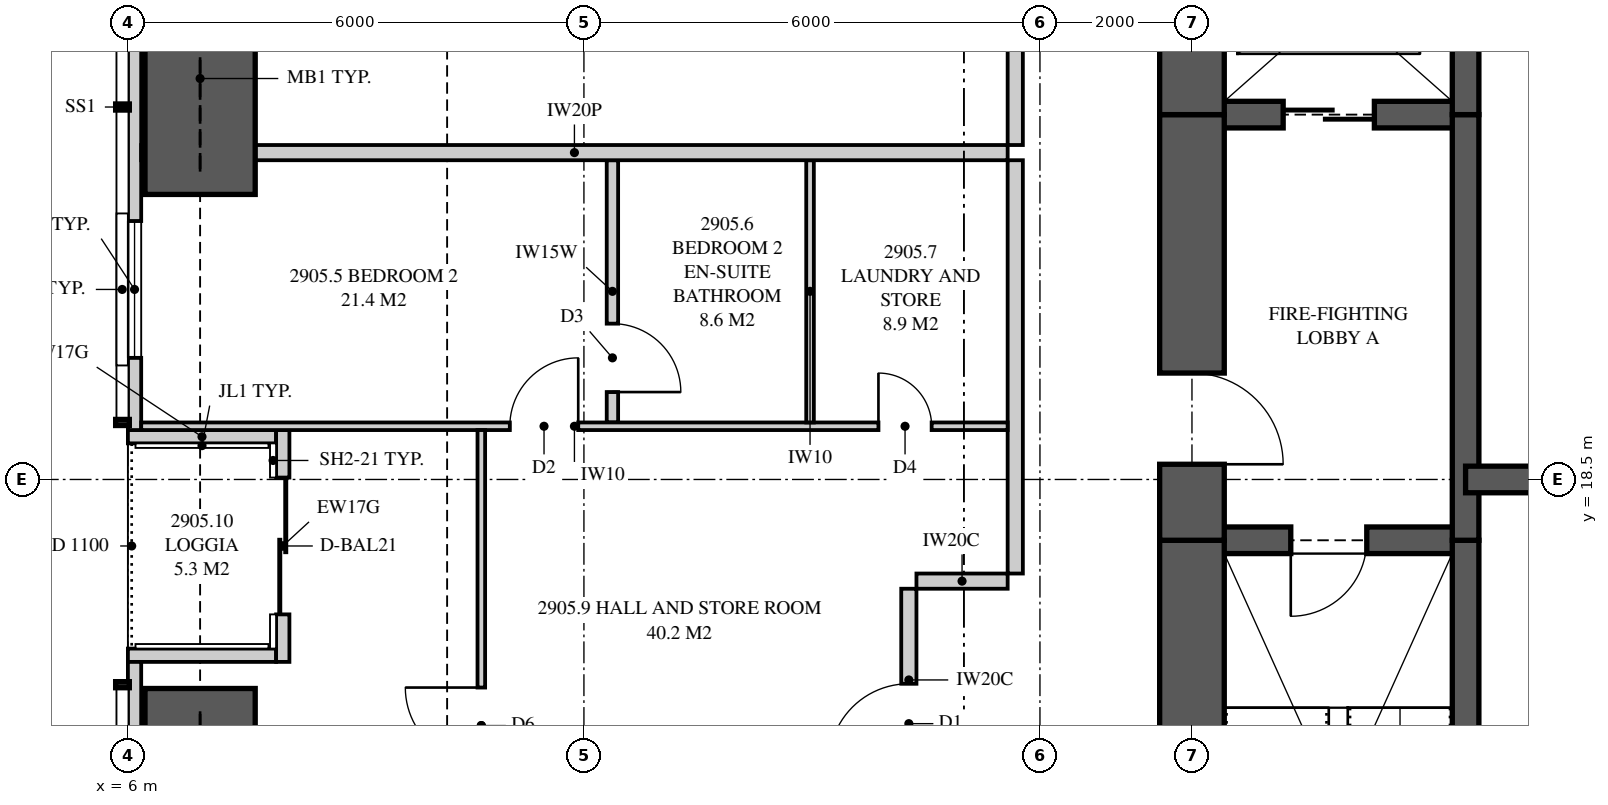
"""IFC4 building model, lengths in metres.
Left out: names, types, materials, properties, quantities, classifications, styles, units other than length and angle.
Written with IfcOpenShell. Run it as: python <this file> out.ifc"""

import sys

from ifc_helpers import new_model, si_unit, direction, frame, frame_2d, origin, place, context, subcontext, project, spatial, polyline, rectangle, outline, extrude, element, fill, save


model = new_model("IFC4")
c1 = context("Model", 3, precision=1e-05, world=origin(), true_north=direction((0.0, 1.0)))
c2 = subcontext(c1, "Body", "Model", "MODEL_VIEW")
j1 = project(units=[si_unit("LENGTHUNIT", "METRE"), si_unit("PLANEANGLEUNIT", "RADIAN")], contexts=[c1])
p1 = place(None, origin())
s1 = spatial("IfcSite", under=j1, at=p1, CompositionType="ELEMENT")
p2 = place(p1, origin())
s2 = spatial("IfcBuilding", under=s1, at=p2, CompositionType="ELEMENT")
p3 = place(p2, frame((0.0, 0.0, 108.2)))
s3 = spatial("IfcBuildingStorey", under=s2, at=p3, CompositionType="ELEMENT", Elevation=108.2)
p4 = place(p3, frame((20.0, 26.125, 0.0), z_axis=(0.0, 0.0, 1.0), x_axis=(0.0, -1.0, 0.0)))
e1 = element("IfcWall", 1, at=p4, inside=s3, PredefinedType="SHEAR", context=c2, shape_type="SweptSolid", body=[
    extrude(rectangle(XDim=2.825, YDim=0.85, at=frame_2d((1.413, 0.0))), origin(), (0.0, 0.0, 1.0), 3.35),
])
p5 = place(p3, frame((20.0, 23.3, 0.0), z_axis=(0.0, 0.0, 1.0), x_axis=(0.0, -1.0, 0.0)))
e2 = element("IfcWall", 2, at=p5, inside=s3, PredefinedType="SHEAR", context=c2, shape_type="SweptSolid", body=[
    extrude(rectangle(XDim=5.6, YDim=0.85, at=frame_2d((2.8, 0.0))), origin(), (0.0, 0.0, 1.0), 3.35),
])
p6 = place(p5, frame((3.4, 0.0, 0.0)))
e3 = element("IfcOpeningElement", 3, at=p6, cuts=e2, PredefinedType="OPENING", context=c2, shape_type="SweptSolid", body=[
    extrude(rectangle(XDim=1.2, YDim=2.2, at=frame_2d((0.6, 1.1))), frame((0.0, 0.435, 0.0), z_axis=(0.0, -1.0, 0.0), x_axis=(1.0, 0.0, 0.0)), (0.0, 0.0, 1.0), 0.87),
])
p7 = place(p3, frame((20.0, 17.7, 0.0), z_axis=(0.0, 0.0, 1.0), x_axis=(0.0, -1.0, 0.0)))
e4 = element("IfcWall", 4, at=p7, inside=s3, PredefinedType="SHEAR", context=c2, shape_type="SweptSolid", body=[
    extrude(rectangle(XDim=4.7, YDim=0.85, at=frame_2d((2.35, 0.0))), origin(), (0.0, 0.0, 1.0), 3.35),
])
p8 = place(p3, frame((23.6, 10.875, 0.0), z_axis=(0.0, 0.0, 1.0), x_axis=(0.0, 1.0, 0.0)))
e5 = element("IfcWall", 5, at=p8, inside=s3, PredefinedType="SHEAR", context=c2, shape_type="SweptSolid", body=[
    extrude(rectangle(XDim=6.825, YDim=0.35, at=frame_2d((3.413, 0.0))), origin(), (0.0, 0.0, 1.0), 3.35),
])
p9 = place(p3, frame((23.6, 17.7, 0.0), z_axis=(0.0, 0.0, 1.0), x_axis=(0.0, 1.0, 0.0)))
e6 = element("IfcWall", 6, at=p9, inside=s3, PredefinedType="SHEAR", context=c2, shape_type="SweptSolid", body=[
    extrude(rectangle(XDim=5.6, YDim=0.35, at=frame_2d((2.8, 0.0))), origin(), (0.0, 0.0, 1.0), 3.35),
])
p10 = place(p3, frame((23.6, 23.3, 0.0), z_axis=(0.0, 0.0, 1.0), x_axis=(0.0, 1.0, 0.0)))
e7 = element("IfcWall", 7, at=p10, inside=s3, PredefinedType="SHEAR", context=c2, shape_type="SweptSolid", body=[
    extrude(rectangle(XDim=2.825, YDim=0.35, at=frame_2d((1.413, 0.0))), origin(), (0.0, 0.0, 1.0), 3.35),
])
p11 = place(p3, frame((20.0, 17.7, 0.0), z_axis=(0.0, 0.0, 1.0), x_axis=(1.0, 0.0, 0.0)))
e8 = element("IfcWall", 8, at=p11, inside=s3, PredefinedType="SHEAR", context=c2, shape_type="SweptSolid", body=[
    extrude(rectangle(XDim=3.6, YDim=0.35, at=frame_2d((1.8, 0.0))), origin(), (0.0, 0.0, 1.0), 3.35),
])
p12 = place(p11, frame((1.3, 0.0, 0.0)))
e9 = element("IfcOpeningElement", 9, at=p12, cuts=e8, PredefinedType="OPENING", context=c2, shape_type="SweptSolid", body=[
    extrude(rectangle(XDim=1.0, YDim=2.1, at=frame_2d((0.5, 1.05))), frame((0.0, 0.185, 0.0), z_axis=(0.0, -1.0, 0.0), x_axis=(1.0, 0.0, 0.0)), (0.0, 0.0, 1.0), 0.37),
])
p13 = place(p3, frame((20.0, 23.3, 0.0), z_axis=(0.0, 0.0, 1.0), x_axis=(1.0, 0.0, 0.0)))
e10 = element("IfcWall", 10, at=p13, inside=s3, PredefinedType="SHEAR", context=c2, shape_type="SweptSolid", body=[
    extrude(rectangle(XDim=3.6, YDim=0.35, at=frame_2d((1.8, 0.0))), origin(), (0.0, 0.0, 1.0), 3.35),
])
p14 = place(p13, frame((1.2, 0.0, 0.0)))
e11 = element("IfcOpeningElement", 11, at=p14, cuts=e10, PredefinedType="OPENING", context=c2, shape_type="SweptSolid", body=[
    extrude(rectangle(XDim=1.2, YDim=2.1, at=frame_2d((0.6, 1.05))), frame((0.0, 0.185, 0.0), z_axis=(0.0, -1.0, 0.0), x_axis=(1.0, 0.0, 0.0)), (0.0, 0.0, 1.0), 0.37),
])
p15 = place(p3, frame((23.6, 18.5, 0.0), z_axis=(0.0, 0.0, 1.0), x_axis=(1.0, 0.0, 0.0)))
e12 = element("IfcWall", 12, at=p15, inside=s3, PredefinedType="SHEAR", context=c2, shape_type="SweptSolid", body=[
    extrude(rectangle(XDim=2.4, YDim=0.35, at=frame_2d((1.2, 0.0))), origin(), (0.0, 0.0, 1.0), 3.35),
])
p16 = place(p3, frame((6.087, 34.949, 0.0), z_axis=(0.0, 0.0, 1.0), x_axis=(0.0, -1.0, 0.0)))
e13 = element("IfcWall", 13, at=p16, inside=s3, PredefinedType="SOLIDWALL", context=c2, shape_type="SweptSolid", body=[
    extrude(outline(polyline([(0.0, 0.0), (15.799, 0.0), (15.799, 2.15), (9.949, 2.15), (9.949, 3.11), (9.823, 3.11), (9.823, 2.15), (9.73, 2.15), (9.73, 3.11), (0.0, 3.11), (0.0, 0.0)])), frame((0.0, 0.087, 0.0), z_axis=(0.0, -1.0, 0.0), x_axis=(1.0, 0.0, 0.0)), (0.0, 0.0, 1.0), 0.175),
])
p17 = place(p16, frame((2.724, 0.0, 0.4)))
e14 = element("IfcOpeningElement", 14, at=p17, cuts=e13, PredefinedType="OPENING", context=c2, shape_type="SweptSolid", body=[
    extrude(rectangle(XDim=1.8, YDim=1.7, at=frame_2d((0.9, 0.85))), frame((0.0, 0.097, 0.0), z_axis=(0.0, -1.0, 0.0), x_axis=(1.0, 0.0, 0.0)), (0.0, 0.0, 1.0), 0.195),
])
p18 = place(p16, frame((5.899, 0.0, 0.4)))
e15 = element("IfcOpeningElement", 15, at=p18, cuts=e13, PredefinedType="OPENING", context=c2, shape_type="SweptSolid", body=[
    extrude(rectangle(XDim=1.2, YDim=1.7, at=frame_2d((0.6, 0.85))), frame((0.0, 0.097, 0.0), z_axis=(0.0, -1.0, 0.0), x_axis=(1.0, 0.0, 0.0)), (0.0, 0.0, 1.0), 0.195),
])
p19 = place(p16, frame((13.049, 0.0, 0.4)))
e16 = element("IfcOpeningElement", 16, at=p19, cuts=e13, PredefinedType="OPENING", context=c2, shape_type="SweptSolid", body=[
    extrude(rectangle(XDim=1.8, YDim=1.7, at=frame_2d((0.9, 0.85))), frame((0.0, 0.097, 0.0), z_axis=(0.0, -1.0, 0.0), x_axis=(1.0, 0.0, 0.0)), (0.0, 0.0, 1.0), 0.195),
])
p20 = place(p3, frame((6.087, 16.1, 0.0), z_axis=(0.0, 0.0, 1.0), x_axis=(0.0, -1.0, 0.0)))
e17 = element("IfcWall", 17, at=p20, inside=s3, PredefinedType="SOLIDWALL", context=c2, shape_type="SweptSolid", body=[
    extrude(outline(polyline([(0.0, 0.0), (13.049, 0.0), (13.049, 3.11), (3.319, 3.11), (3.319, 2.15), (3.226, 2.15), (3.226, 3.11), (3.1, 3.11), (3.1, 2.15), (0.0, 2.15), (0.0, 0.0)])), frame((0.0, 0.087, 0.0), z_axis=(0.0, -1.0, 0.0), x_axis=(1.0, 0.0, 0.0)), (0.0, 0.0, 1.0), 0.175),
])
p21 = place(p20, frame((5.975, 0.0, 0.4)))
e18 = element("IfcOpeningElement", 18, at=p21, cuts=e17, PredefinedType="OPENING", context=c2, shape_type="SweptSolid", body=[
    extrude(rectangle(XDim=1.8, YDim=1.7, at=frame_2d((0.9, 0.85))), frame((0.0, 0.097, 0.0), z_axis=(0.0, -1.0, 0.0), x_axis=(1.0, 0.0, 0.0)), (0.0, 0.0, 1.0), 0.195),
])
p22 = place(p20, frame((9.025, 0.0, 0.4)))
e19 = element("IfcOpeningElement", 19, at=p22, cuts=e17, PredefinedType="OPENING", context=c2, shape_type="SweptSolid", body=[
    extrude(rectangle(XDim=1.8, YDim=1.7, at=frame_2d((0.9, 0.85))), frame((0.0, 0.097, 0.0), z_axis=(0.0, -1.0, 0.0), x_axis=(1.0, 0.0, 0.0)), (0.0, 0.0, 1.0), 0.195),
])
p23 = place(p3, frame((8.038, 19.15, 0.0), z_axis=(0.0, 0.0, 1.0), x_axis=(0.0, -1.0, 0.0)))
e20 = element("IfcWall", 20, at=p23, inside=s3, PredefinedType="SOLIDWALL", context=c2, shape_type="SweptSolid", body=[
    extrude(rectangle(XDim=3.05, YDim=0.175, at=frame_2d((1.525, 0.0))), origin(), (0.0, 0.0, 1.0), 3.11),
])
p24 = place(p23, frame((0.625, 0.0, 0.0)))
e21 = element("IfcOpeningElement", 21, at=p24, cuts=e20, PredefinedType="OPENING", context=c2, shape_type="SweptSolid", body=[
    extrude(rectangle(XDim=1.8, YDim=2.1, at=frame_2d((0.9, 1.05))), frame((0.0, 0.097, 0.0), z_axis=(0.0, -1.0, 0.0), x_axis=(1.0, 0.0, 0.0)), (0.0, 0.0, 1.0), 0.195),
])
for number, where, z_axis, x_axis in (
    (22, (6.0, 19.062, 0.0), (0.0, 0.0, 1.0), (1.0, 0.0, 0.0)),
    (23, (6.0, 16.188, 0.0), (0.0, 0.0, 1.0), (1.0, 0.0, 0.0)),
):
    element("IfcWall", number, at=place(p3, frame(where, z_axis=z_axis, x_axis=x_axis)), inside=s3, PredefinedType="SOLIDWALL", context=c2, shape_type="SweptSolid", body=[
        extrude(outline(polyline([(0.0, 0.0), (1.95, 0.0), (1.95, 3.11), (1.75, 3.11), (1.75, 2.15), (0.15, 2.15), (0.15, 3.11), (0.0, 3.11), (0.0, 0.0)])), frame((0.0, 0.087, 0.0), z_axis=(0.0, -1.0, 0.0), x_axis=(1.0, 0.0, 0.0)), (0.0, 0.0, 1.0), 0.175),
    ])
p25 = place(p3, frame((6.175, 22.8, 0.0), z_axis=(0.0, 0.0, 1.0), x_axis=(1.0, 0.0, 0.0)))
e24 = element("IfcWall", 24, at=p25, inside=s3, PredefinedType="PARTITIONING", context=c2, shape_type="SweptSolid", body=[
    extrude(outline(polyline([(0.0, 0.0), (11.4, 0.0), (11.4, 3.11), (5.335, 3.11), (5.335, 2.51), (2.715, 2.51), (2.715, 3.11), (1.685, 3.11), (1.685, 2.15), (0.0, 2.15), (0.0, 0.0)])), frame((0.0, 0.1, 0.0), z_axis=(0.0, -1.0, 0.0), x_axis=(1.0, 0.0, 0.0)), (0.0, 0.0, 1.0), 0.2),
])
p26 = place(p3, frame((6.175, 19.2, 0.0), z_axis=(0.0, 0.0, 1.0), x_axis=(1.0, 0.0, 0.0)))
e25 = element("IfcWall", 25, at=p26, inside=s3, PredefinedType="PARTITIONING", context=c2, shape_type="SweptSolid", body=[
    extrude(outline(polyline([(0.0, 0.0), (11.4, 0.0), (11.4, 3.11), (5.285, 3.11), (5.285, 2.51), (2.765, 2.51), (2.765, 3.11), (1.635, 3.11), (1.635, 2.15), (0.0, 2.15), (0.0, 3.11), (0.0, 0.0)])), frame((0.0, 0.05, 0.0), z_axis=(0.0, -1.0, 0.0), x_axis=(1.0, 0.0, 0.0)), (0.0, 0.0, 1.0), 0.1),
])
p27 = place(p26, frame((4.85, 0.0, 0.0)))
e26 = element("IfcOpeningElement", 26, at=p27, cuts=e25, PredefinedType="OPENING", context=c2, shape_type="SweptSolid", body=[
    extrude(rectangle(XDim=0.9, YDim=2.1, at=frame_2d((0.45, 1.05))), frame((0.0, 0.06, 0.0), z_axis=(0.0, -1.0, 0.0), x_axis=(1.0, 0.0, 0.0)), (0.0, 0.0, 1.0), 0.12),
])
p28 = place(p26, frame((9.7, 0.0, 0.0)))
e27 = element("IfcOpeningElement", 27, at=p28, cuts=e25, PredefinedType="OPENING", context=c2, shape_type="SweptSolid", body=[
    extrude(rectangle(XDim=0.7, YDim=2.1, at=frame_2d((0.35, 1.05))), frame((0.0, 0.06, 0.0), z_axis=(0.0, -1.0, 0.0), x_axis=(1.0, 0.0, 0.0)), (0.0, 0.0, 1.0), 0.12),
])
p29 = place(p3, frame((12.375, 19.25, 0.0), z_axis=(0.0, 0.0, 1.0), x_axis=(0.0, 1.0, 0.0)))
e28 = element("IfcWall", 28, at=p29, inside=s3, PredefinedType="PLUMBINGWALL", context=c2, shape_type="SweptSolid", body=[
    extrude(rectangle(XDim=3.45, YDim=0.15, at=frame_2d((1.725, 0.0))), origin(), (0.0, 0.0, 1.0), 3.11),
])
p30 = place(p29, frame((0.4, 0.0, 0.0)))
e29 = element("IfcOpeningElement", 29, at=p30, cuts=e28, PredefinedType="OPENING", context=c2, shape_type="SweptSolid", body=[
    extrude(rectangle(XDim=0.9, YDim=2.1, at=frame_2d((0.45, 1.05))), frame((0.0, 0.085, 0.0), z_axis=(0.0, -1.0, 0.0), x_axis=(1.0, 0.0, 0.0)), (0.0, 0.0, 1.0), 0.17),
])
p31 = place(p3, frame((14.975, 19.25, 0.0), z_axis=(0.0, 0.0, 1.0), x_axis=(0.0, 1.0, 0.0)))
e30 = element("IfcWall", 30, at=p31, inside=s3, PredefinedType="PARTITIONING", context=c2, shape_type="SweptSolid", body=[
    extrude(rectangle(XDim=3.45, YDim=0.1, at=frame_2d((1.725, 0.0))), origin(), (0.0, 0.0, 1.0), 3.11),
])
p32 = place(p3, frame((10.65, 11.375, 0.0), z_axis=(0.0, 0.0, 1.0), x_axis=(0.0, 1.0, 0.0)))
e31 = element("IfcWall", 31, at=p32, inside=s3, PredefinedType="PARTITIONING", context=c2, shape_type="SweptSolid", body=[
    extrude(outline(polyline([(0.0, 0.0), (7.775, 0.0), (7.775, 3.11), (7.775, 2.51), (1.685, 2.51), (0.0, 2.51), (0.0, 3.11), (0.0, 0.0)])), frame((0.0, 0.05, 0.0), z_axis=(0.0, -1.0, 0.0), x_axis=(1.0, 0.0, 0.0)), (0.0, 0.0, 1.0), 0.1),
])
p33 = place(p32, frame((3.387, 0.0, 0.0)))
e32 = element("IfcOpeningElement", 32, at=p33, cuts=e31, PredefinedType="OPENING", context=c2, shape_type="SweptSolid", body=[
    extrude(rectangle(XDim=1.0, YDim=2.1, at=frame_2d((0.5, 1.05))), frame((0.0, 0.06, 0.0), z_axis=(0.0, -1.0, 0.0), x_axis=(1.0, 0.0, 0.0)), (0.0, 0.0, 1.0), 0.12),
])
p34 = place(p3, frame((17.675, 22.9, 0.0), z_axis=(0.0, 0.0, 1.0), x_axis=(0.0, 1.0, 0.0)))
e33 = element("IfcWall", 33, at=p34, inside=s3, PredefinedType="PARTITIONING", context=c2, shape_type="SweptSolid", body=[
    extrude(outline(polyline([(0.0, 0.0), (6.275, 0.0), (6.275, 3.11), (3.862, 3.11), (3.862, 2.541), (3.188, 2.541), (3.188, 3.11), (0.0, 3.11), (0.0, 0.0)])), frame((0.0, 0.1, 0.0), z_axis=(0.0, -1.0, 0.0), x_axis=(1.0, 0.0, 0.0)), (0.0, 0.0, 1.0), 0.2),
])
p35 = place(p34, frame((2.238, 0.0, 0.0)))
e34 = element("IfcOpeningElement", 34, at=p35, cuts=e33, PredefinedType="OPENING", context=c2, shape_type="SweptSolid", body=[
    extrude(rectangle(XDim=1.8, YDim=2.1, at=frame_2d((0.9, 1.05))), frame((0.0, 0.11, 0.0), z_axis=(0.0, -1.0, 0.0), x_axis=(1.0, 0.0, 0.0)), (0.0, 0.0, 1.0), 0.22),
])
p36 = place(p3, frame((17.675, 17.262, 0.0), z_axis=(0.0, 0.0, 1.0), x_axis=(0.0, 1.0, 0.0)))
e35 = element("IfcWall", 35, at=p36, inside=s3, PredefinedType="PARTITIONING", context=c2, shape_type="SweptSolid", body=[
    extrude(rectangle(XDim=5.438, YDim=0.2, at=frame_2d((2.719, 0.0))), origin(), (0.0, 0.0, 1.0), 3.11),
])
p37 = place(p3, frame((16.275, 14.663, 0.0), z_axis=(0.0, 0.0, 1.0), x_axis=(0.0, 1.0, 0.0)))
e36 = element("IfcWall", 36, at=p37, inside=s3, PredefinedType="PARTITIONING", context=c2, shape_type="SweptSolid", body=[
    extrude(rectangle(XDim=2.4, YDim=0.2, at=frame_2d((1.2, 0.0))), origin(), (0.0, 0.0, 1.0), 3.11),
])
p38 = place(p37, frame((0.1, 0.0, 0.0)))
e37 = element("IfcOpeningElement", 37, at=p38, cuts=e36, PredefinedType="OPENING", context=c2, shape_type="SweptSolid", body=[
    extrude(rectangle(XDim=1.05, YDim=2.2, at=frame_2d((0.525, 1.1))), frame((0.0, 0.11, 0.0), z_axis=(0.0, -1.0, 0.0), x_axis=(1.0, 0.0, 0.0)), (0.0, 0.0, 1.0), 0.22),
])
p39 = place(p3, frame((17.575, 17.163, 0.0), z_axis=(0.0, 0.0, 1.0), x_axis=(-1.0, 0.0, 0.0)))
e38 = element("IfcWall", 38, at=p39, inside=s3, PredefinedType="PARTITIONING", context=c2, shape_type="SweptSolid", body=[
    extrude(rectangle(XDim=1.2, YDim=0.2, at=frame_2d((0.6, 0.0))), origin(), (0.0, 0.0, 1.0), 3.11),
])
for number, where, z_axis, x_axis in (
    (39, (6.95, 22.25, 0.0), (0.0, 0.0, 1.0), (0.0, 1.0, 0.0)),
    (40, (6.95, 10.25, 0.0), (0.0, 0.0, 1.0), (0.0, 1.0, 0.0)),
):
    element("IfcWall", number, at=place(p3, frame(where, z_axis=z_axis, x_axis=x_axis)), inside=s3, PredefinedType="SHEAR", context=c2, shape_type="SweptSolid", body=[
        extrude(rectangle(XDim=5.5, YDim=1.45, at=frame_2d((2.75, 0.0))), origin(), (0.0, 0.0, 1.0), 3.35),
    ])
p40 = place(p19, origin())
e41 = element("IfcWindow", 41, at=p40, inside=s3, PartitioningType="SINGLE_PANEL", PredefinedType="WINDOW", context=c2, shape_type="SweptSolid", body=[
    extrude(rectangle(XDim=1.8, YDim=1.7, at=frame_2d((0.9, 0.85))), frame((0.0, 0.03, 0.0), z_axis=(0.0, -1.0, 0.0), x_axis=(1.0, 0.0, 0.0)), (0.0, 0.0, 1.0), 0.06),
])
fill(e16, e41)
p41 = place(p24, origin())
e42 = element("IfcDoor", 42, at=p41, inside=s3, OperationType="SLIDING_TO_LEFT", PredefinedType="DOOR", context=c2, shape_type="SweptSolid", body=[
    extrude(rectangle(XDim=1.8, YDim=2.1, at=frame_2d((0.9, 1.05))), frame((0.0, 0.025, 0.0), z_axis=(0.0, -1.0, 0.0), x_axis=(1.0, 0.0, 0.0)), (0.0, 0.0, 1.0), 0.05),
])
fill(e21, e42)
p42 = place(p38, origin())
e43 = element("IfcDoor", 43, at=p42, inside=s3, OperationType="SINGLE_SWING_LEFT", PredefinedType="DOOR", context=c2, shape_type="SweptSolid", body=[
    extrude(rectangle(XDim=1.05, YDim=2.2, at=frame_2d((0.525, 1.1))), frame((0.0, 0.025, 0.0), z_axis=(0.0, -1.0, 0.0), x_axis=(1.0, 0.0, 0.0)), (0.0, 0.0, 1.0), 0.05),
])
fill(e37, e43)
p43 = place(p27, origin())
e44 = element("IfcDoor", 44, at=p43, inside=s3, OperationType="SINGLE_SWING_RIGHT", PredefinedType="DOOR", context=c2, shape_type="SweptSolid", body=[
    extrude(rectangle(XDim=0.9, YDim=2.1, at=frame_2d((0.45, 1.05))), frame((0.0, 0.025, 0.0), z_axis=(0.0, -1.0, 0.0), x_axis=(1.0, 0.0, 0.0)), (0.0, 0.0, 1.0), 0.05),
])
fill(e26, e44)
p44 = place(p30, frame((0.9, 0.0, 0.0), z_axis=(0.0, 0.0, 1.0), x_axis=(-1.0, 0.0, 0.0)))
e45 = element("IfcDoor", 45, at=p44, inside=s3, OperationType="SINGLE_SWING_RIGHT", PredefinedType="DOOR", context=c2, shape_type="SweptSolid", body=[
    extrude(rectangle(XDim=0.9, YDim=2.1, at=frame_2d((0.45, 1.05))), frame((0.0, 0.025, 0.0), z_axis=(0.0, -1.0, 0.0), x_axis=(1.0, 0.0, 0.0)), (0.0, 0.0, 1.0), 0.05),
])
fill(e29, e45)
p45 = place(p28, origin())
e46 = element("IfcDoor", 46, at=p45, inside=s3, OperationType="SINGLE_SWING_LEFT", PredefinedType="DOOR", context=c2, shape_type="SweptSolid", body=[
    extrude(rectangle(XDim=0.7, YDim=2.1, at=frame_2d((0.35, 1.05))), frame((0.0, 0.025, 0.0), z_axis=(0.0, -1.0, 0.0), x_axis=(1.0, 0.0, 0.0)), (0.0, 0.0, 1.0), 0.05),
])
fill(e27, e46)
p46 = place(p33, origin())
e47 = element("IfcDoor", 47, at=p46, inside=s3, OperationType="SINGLE_SWING_RIGHT", PredefinedType="DOOR", context=c2, shape_type="SweptSolid", body=[
    extrude(rectangle(XDim=1.0, YDim=2.1, at=frame_2d((0.5, 1.05))), frame((0.0, 0.025, 0.0), z_axis=(0.0, -1.0, 0.0), x_axis=(1.0, 0.0, 0.0)), (0.0, 0.0, 1.0), 0.05),
])
fill(e32, e47)
p47 = place(p12, frame((1.0, 0.0, 0.0), z_axis=(0.0, 0.0, 1.0), x_axis=(-1.0, 0.0, 0.0)))
e48 = element("IfcDoor", 48, at=p47, inside=s3, OperationType="SINGLE_SWING_RIGHT", PredefinedType="DOOR", context=c2, shape_type="SweptSolid", body=[
    extrude(rectangle(XDim=1.0, YDim=2.1, at=frame_2d((0.5, 1.05))), frame((0.0, 0.025, 0.0), z_axis=(0.0, -1.0, 0.0), x_axis=(1.0, 0.0, 0.0)), (0.0, 0.0, 1.0), 0.05),
])
fill(e9, e48)
p48 = place(p6, origin())
e49 = element("IfcDoor", 49, at=p48, inside=s3, OperationType="SINGLE_SWING_RIGHT", PredefinedType="DOOR", context=c2, shape_type="SweptSolid", body=[
    extrude(rectangle(XDim=1.2, YDim=2.2, at=frame_2d((0.6, 1.1))), frame((0.0, 0.025, 0.0), z_axis=(0.0, -1.0, 0.0), x_axis=(1.0, 0.0, 0.0)), (0.0, 0.0, 1.0), 0.05),
])
fill(e3, e49)
p49 = place(p14, origin())
e50 = element("IfcDoor", 50, at=p49, inside=s3, OperationType="SLIDING_TO_LEFT", PredefinedType="DOOR", context=c2, shape_type="SweptSolid", body=[
    extrude(rectangle(XDim=1.2, YDim=2.1, at=frame_2d((0.6, 1.05))), frame((0.0, 0.025, 0.0), z_axis=(0.0, -1.0, 0.0), x_axis=(1.0, 0.0, 0.0)), (0.0, 0.0, 1.0), 0.05),
])
fill(e11, e50)
save(model, sys.argv[1])
